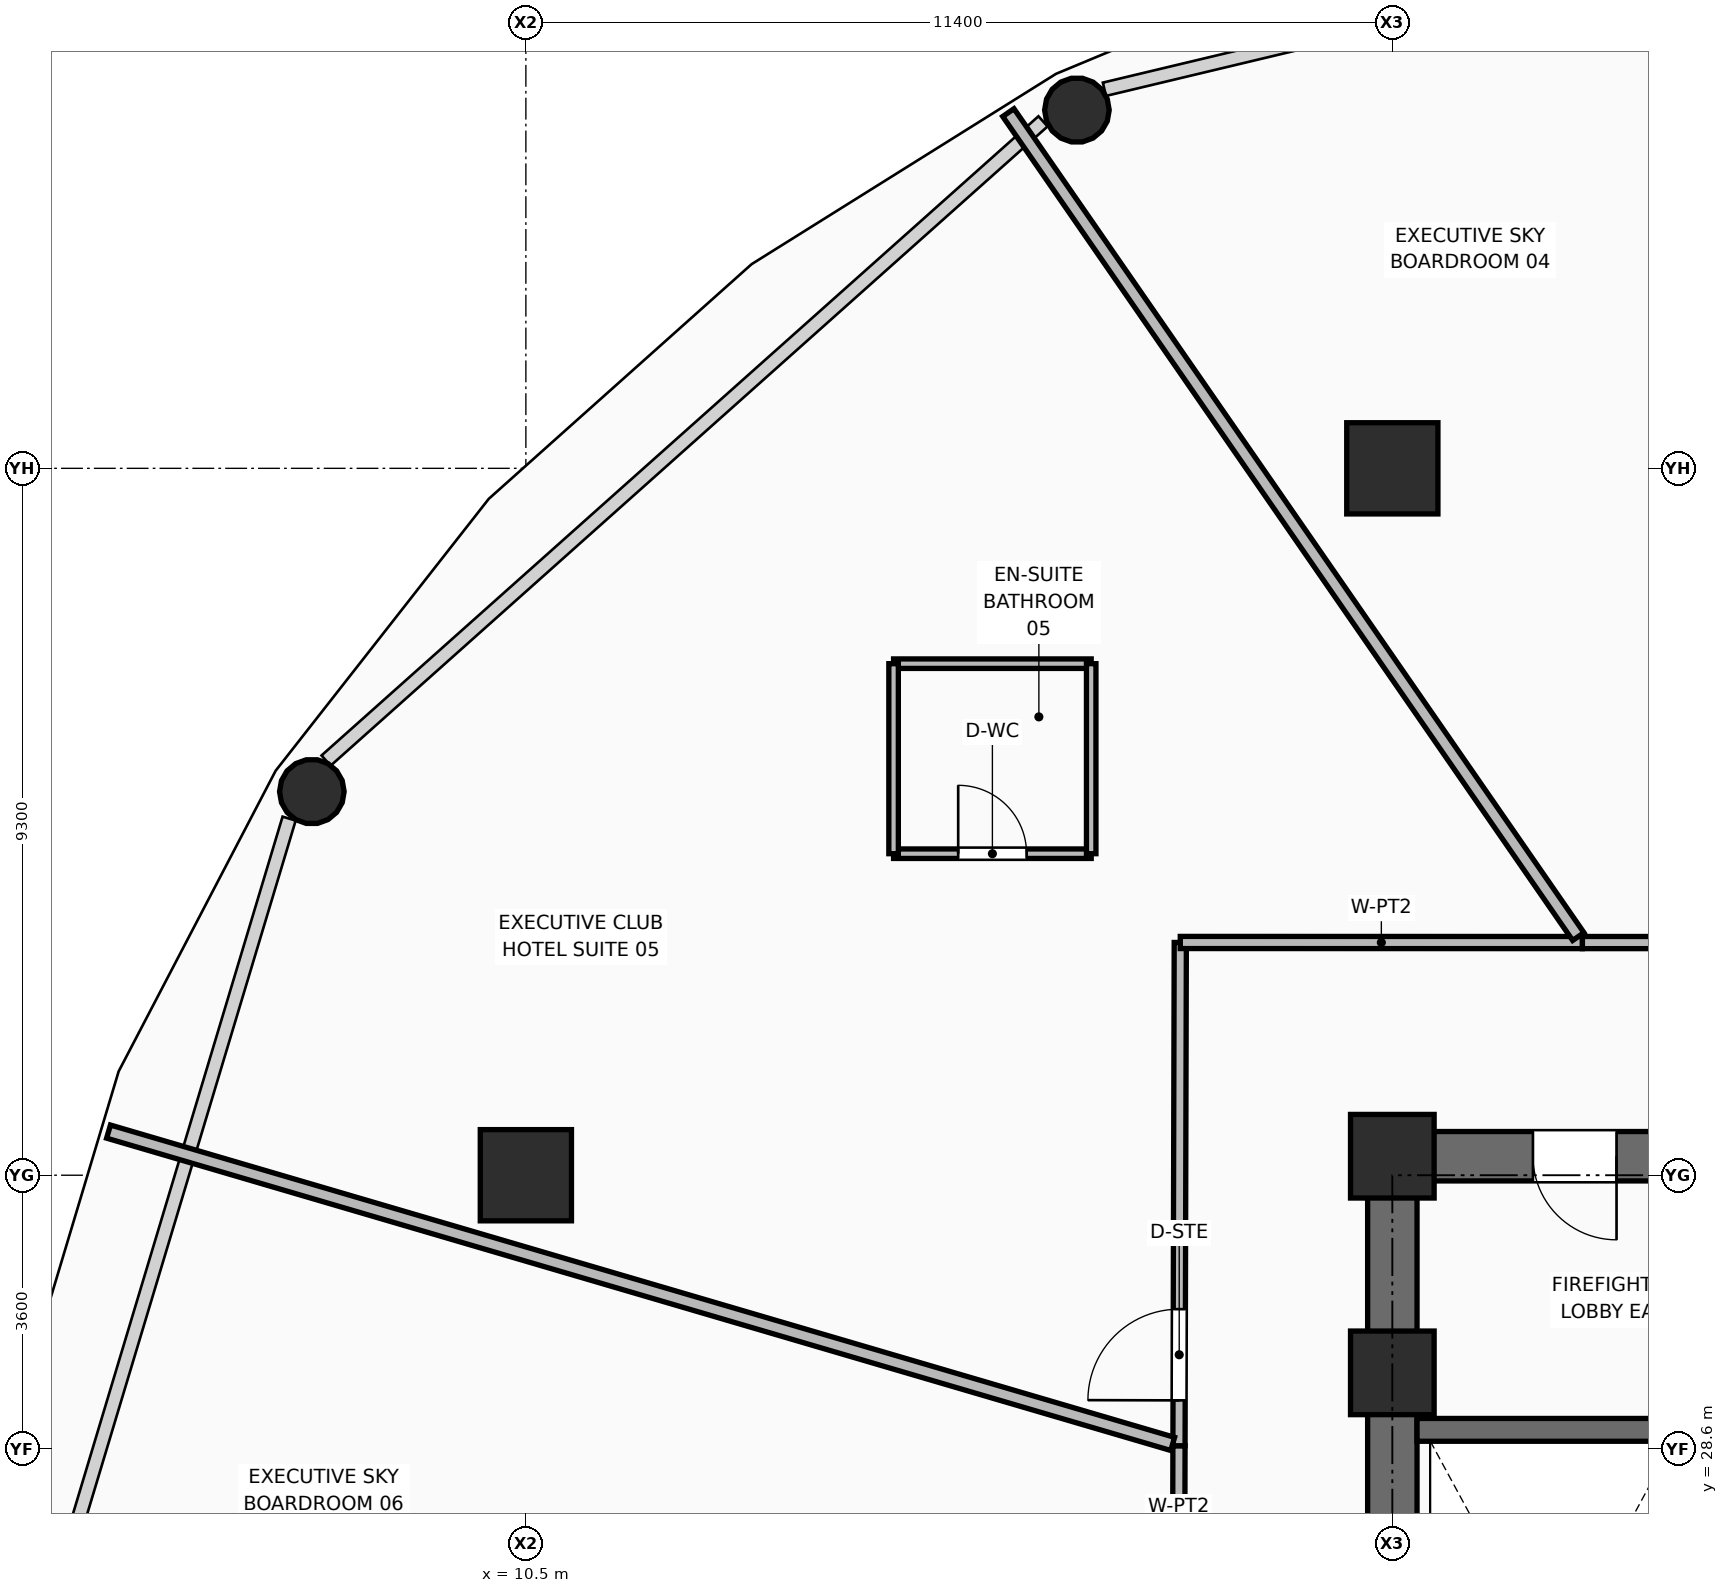
"""IFC4 building model, lengths in metres.
Left out: names, types, materials, properties, quantities, classifications, styles, units other than length and angle.
Written with IfcOpenShell. Run it as: python <this file> out.ifc"""

import sys

from ifc_helpers import new_model, si_unit, direction, frame, frame_2d, origin, origin_2d, place, context, subcontext, project, spatial, rectangle, hollow_rectangle, hollow_circle, extrude, element, fill, save


model = new_model("IFC4")
c1 = context("Model", 3, precision=1e-05, world=origin(), true_north=direction((0.0, 1.0)))
c2 = subcontext(c1, "Body", "Model", "MODEL_VIEW")
j1 = project(units=[si_unit("LENGTHUNIT", "METRE"), si_unit("PLANEANGLEUNIT", "RADIAN")], contexts=[c1])
p1 = place(None, origin())
s1 = spatial("IfcSite", under=j1, at=p1, CompositionType="ELEMENT")
p2 = place(p1, origin())
s2 = spatial("IfcBuilding", under=s1, at=p2, CompositionType="ELEMENT")
p3 = place(p2, frame((0.0, 0.0, 87.0)))
s3 = spatial("IfcBuildingStorey", under=s2, at=p3, CompositionType="ELEMENT", Elevation=87.0)
for number, where, z_axis, x_axis in (
    (1, (21.9, 29.6, 0.0), (0.0, 0.0, 1.0), (1.0, 0.0, 0.0)),
    (2, (21.9, 32.45, 0.0), (0.0, 0.0, 1.0), (1.0, 0.0, 0.0)),
):
    element("IfcColumn", number, at=place(p3, frame(where, z_axis=z_axis, x_axis=x_axis)), inside=s3, PredefinedType="COLUMN", context=c2, shape_type="SweptSolid", body=[
        extrude(rectangle(XDim=1.1, YDim=1.1, at=origin_2d()), origin(), (0.0, 0.0, 1.0), 3.75),
    ])
for number, where, z_axis, x_axis in (
    (3, (10.5, 32.2, 0.0), (0.0, 0.0, 1.0), (1.0, 0.0, 0.0)),
    (4, (21.9, 41.5, 0.0), (0.0, 0.0, 1.0), (1.0, 0.0, 0.0)),
):
    element("IfcColumn", number, at=place(p3, frame(where, z_axis=z_axis, x_axis=x_axis)), inside=s3, PredefinedType="COLUMN", context=c2, shape_type="SweptSolid", body=[
        extrude(hollow_rectangle(XDim=1.2, YDim=1.2, WallThickness=0.045, at=origin_2d()), origin(), (0.0, 0.0, 1.0), 3.75),
    ])
p4 = place(p3, frame((17.75, 46.213, 0.0), z_axis=(0.063867569811, -0.098710723407, 0.993064512814), x_axis=(0.839585964149, 0.543226848383, 0.0)))
e5 = element("IfcColumn", 5, at=p4, inside=s3, PredefinedType="COLUMN", context=c2, shape_type="SweptSolid", body=[
    extrude(hollow_circle(Radius=0.425, WallThickness=0.04, at=origin_2d()), origin(), (0.0, 0.0, 1.0), 3.524),
])
p5 = place(p3, frame((7.684, 37.247, 0.0), z_axis=(0.110532853476, -0.057031353328, 0.992234807412), x_axis=(0.458529519134, 0.888679177253, 0.0)))
e6 = element("IfcColumn", 6, at=p5, inside=s3, PredefinedType="COLUMN", context=c2, shape_type="SweptSolid", body=[
    extrude(hollow_circle(Radius=0.425, WallThickness=0.04, at=origin_2d()), origin(), (0.0, 0.0, 1.0), 3.527),
])
p6 = place(p3, frame((21.575, 32.45, 0.0), z_axis=(0.0, 0.0, 1.0), x_axis=(1.0, 0.0, 0.0)))
e7 = element("IfcWall", 7, at=p6, inside=s3, PredefinedType="SHEAR", context=c2, shape_type="SweptSolid", body=[
    extrude(rectangle(XDim=19.85, YDim=0.65, at=frame_2d((9.925, 0.0))), origin(), (0.0, 0.0, 1.0), 3.5),
])
p7 = place(p6, frame((2.175, 0.0, 0.0)))
e8 = element("IfcOpeningElement", 8, at=p7, cuts=e7, PredefinedType="OPENING", context=c2, shape_type="SweptSolid", body=[
    extrude(rectangle(XDim=1.1, YDim=2.1, at=frame_2d((0.55, 1.05))), frame((0.0, 0.335, 0.0), z_axis=(0.0, -1.0, 0.0), x_axis=(1.0, 0.0, 0.0)), (0.0, 0.0, 1.0), 0.67),
])
p8 = place(p6, frame((15.565, 0.0, 0.0)))
e9 = element("IfcOpeningElement", 9, at=p8, cuts=e7, PredefinedType="OPENING", context=c2, shape_type="SweptSolid", body=[
    extrude(rectangle(XDim=1.0, YDim=2.1, at=frame_2d((0.5, 1.05))), frame((0.0, 0.335, 0.0), z_axis=(0.0, -1.0, 0.0), x_axis=(1.0, 0.0, 0.0)), (0.0, 0.0, 1.0), 0.67),
])
p9 = place(p6, frame((17.575, 0.0, 0.0)))
e10 = element("IfcOpeningElement", 10, at=p9, cuts=e7, PredefinedType="OPENING", context=c2, shape_type="SweptSolid", body=[
    extrude(rectangle(XDim=0.9, YDim=2.1, at=frame_2d((0.45, 1.05))), frame((0.0, 0.335, 0.0), z_axis=(0.0, -1.0, 0.0), x_axis=(1.0, 0.0, 0.0)), (0.0, 0.0, 1.0), 0.67),
])
p10 = place(p3, frame((21.9, 18.125, 0.0), z_axis=(0.0, 0.0, 1.0), x_axis=(0.0, 1.0, 0.0)))
e11 = element("IfcWall", 11, at=p10, inside=s3, PredefinedType="SHEAR", context=c2, shape_type="SweptSolid", body=[
    extrude(rectangle(XDim=14.0, YDim=0.65, at=frame_2d((7.0, 0.0))), origin(), (0.0, 0.0, 1.0), 3.5),
])
p11 = place(p3, frame((22.225, 28.85, 0.0), z_axis=(0.0, 0.0, 1.0), x_axis=(1.0, 0.0, 0.0)))
e12 = element("IfcWall", 12, at=p11, inside=s3, PredefinedType="SHEAR", context=c2, shape_type="SweptSolid", body=[
    extrude(rectangle(XDim=3.515, YDim=0.3, at=frame_2d((1.757, 0.0))), origin(), (0.0, 0.0, 1.0), 3.5),
])
p12 = place(p3, frame((19.087, 26.138, 0.0), z_axis=(0.0, 0.0, 1.0), x_axis=(0.00243830349, 0.999997027334, 0.0)))
e13 = element("IfcWall", 13, at=p12, inside=s3, PredefinedType="PARTITIONING", context=c2, shape_type="SweptSolid", body=[
    extrude(rectangle(XDim=2.503, YDim=0.16, at=frame_2d((1.251, 0.0))), origin(), (0.0, 0.0, 1.0), 3.48),
])
p13 = place(p3, frame((19.093, 28.641, 0.0), z_axis=(0.0, 0.0, 1.0), x_axis=(0.002581207523, 0.999996668678, 0.0)))
e14 = element("IfcWall", 14, at=p13, inside=s3, PredefinedType="PARTITIONING", context=c2, shape_type="SweptSolid", body=[
    extrude(rectangle(XDim=6.621, YDim=0.16, at=frame_2d((3.311, 0.0))), origin(), (0.0, 0.0, 1.0), 2.858),
])
p14 = place(p13, frame((0.597, 0.0, 0.0)))
e15 = element("IfcOpeningElement", 15, at=p14, cuts=e14, PredefinedType="OPENING", context=c2, shape_type="SweptSolid", body=[
    extrude(rectangle(XDim=1.2, YDim=2.1, at=frame_2d((0.6, 1.05))), frame((0.0, 0.09, 0.0), z_axis=(0.0, -1.0, 0.0), x_axis=(1.0, 0.0, 0.0)), (0.0, 0.0, 1.0), 0.18),
])
p15 = place(p3, frame((19.11, 35.262, 0.0), z_axis=(0.0, 0.0, 1.0), x_axis=(0.999999982965, -0.000184578466, 0.0)))
e16 = element("IfcWall", 16, at=p15, inside=s3, PredefinedType="PARTITIONING", context=c2, shape_type="SweptSolid", body=[
    extrude(rectangle(XDim=5.291, YDim=0.16, at=frame_2d((2.646, 0.0))), origin(), (0.0, 0.0, 1.0), 2.858),
])
p16 = place(p3, frame((24.401, 35.261, 0.0), z_axis=(0.0, 0.0, 1.0), x_axis=(0.999999978267, -0.000208485349, 0.0)))
e17 = element("IfcWall", 17, at=p16, inside=s3, PredefinedType="PARTITIONING", context=c2, shape_type="SweptSolid", body=[
    extrude(rectangle(XDim=4.684, YDim=0.16, at=frame_2d((2.342, 0.0))), origin(), (0.0, 0.0, 1.0), 3.48),
])
p17 = place(p16, frame((1.742, 0.0, 0.0)))
e18 = element("IfcOpeningElement", 18, at=p17, cuts=e17, PredefinedType="OPENING", context=c2, shape_type="SweptSolid", body=[
    extrude(rectangle(XDim=1.2, YDim=2.1, at=frame_2d((0.6, 1.05))), frame((0.0, 0.09, 0.0), z_axis=(0.0, -1.0, 0.0), x_axis=(1.0, 0.0, 0.0)), (0.0, 0.0, 1.0), 0.18),
])
p18 = place(p3, frame((24.347, 35.34, 0.0), z_axis=(0.0, 0.0, 1.0), x_axis=(-0.568928704045, 0.822386849186, 0.0)))
e19 = element("IfcWall", 19, at=p18, inside=s3, PredefinedType="PARTITIONING", context=c2, shape_type="SweptSolid", body=[
    extrude(rectangle(XDim=13.181, YDim=0.18, at=frame_2d((6.59, 0.0))), origin(), (0.0, 0.0, 1.0), 2.705),
])
p19 = place(p3, frame((19.01, 28.665, 0.0), z_axis=(0.0, 0.0, 1.0), x_axis=(-0.959533182325, 0.281595582383, 0.0)))
e20 = element("IfcWall", 20, at=p19, inside=s3, PredefinedType="PARTITIONING", context=c2, shape_type="SweptSolid", body=[
    extrude(rectangle(XDim=14.592, YDim=0.18, at=frame_2d((7.296, 0.0))), origin(), (0.0, 0.0, 1.0), 2.705),
])
p20 = place(p3, frame((15.338, 36.43, 0.0), z_axis=(0.0, 0.0, 1.0), x_axis=(1.0, 0.0, 0.0)))
e21 = element("IfcWall", 21, at=p20, inside=s3, PredefinedType="PARTITIONING", context=c2, shape_type="SweptSolid", body=[
    extrude(rectangle(XDim=2.6, YDim=0.125, at=frame_2d((1.3, 0.0))), origin(), (0.0, 0.0, 1.0), 3.48),
])
p21 = place(p20, frame((0.85, 0.0, 0.0)))
e22 = element("IfcOpeningElement", 22, at=p21, cuts=e21, PredefinedType="OPENING", context=c2, shape_type="SweptSolid", body=[
    extrude(rectangle(XDim=0.9, YDim=2.1, at=frame_2d((0.45, 1.05))), frame((0.0, 0.073, 0.0), z_axis=(0.0, -1.0, 0.0), x_axis=(1.0, 0.0, 0.0)), (0.0, 0.0, 1.0), 0.145),
])
p22 = place(p3, frame((15.338, 38.93, 0.0), z_axis=(0.0, 0.0, 1.0), x_axis=(1.0, 0.0, 0.0)))
e23 = element("IfcWall", 23, at=p22, inside=s3, PredefinedType="PARTITIONING", context=c2, shape_type="SweptSolid", body=[
    extrude(rectangle(XDim=2.6, YDim=0.125, at=frame_2d((1.3, 0.0))), origin(), (0.0, 0.0, 1.0), 3.48),
])
for number, where, z_axis, x_axis in (
    (24, (15.338, 36.43, 0.0), (0.0, 0.0, 1.0), (0.0, 1.0, 0.0)),
    (25, (17.938, 36.43, 0.0), (0.0, 0.0, 1.0), (0.0, 1.0, 0.0)),
):
    element("IfcWall", number, at=place(p3, frame(where, z_axis=z_axis, x_axis=x_axis)), inside=s3, PredefinedType="PARTITIONING", context=c2, shape_type="SweptSolid", body=[
        extrude(rectangle(XDim=2.5, YDim=0.125, at=frame_2d((1.25, 0.0))), origin(), (0.0, 0.0, 1.0), 3.48),
    ])
p23 = place(p7, frame((1.1, 0.0, 0.0), z_axis=(0.0, 0.0, 1.0), x_axis=(-1.0, 0.0, 0.0)))
e26 = element("IfcDoor", 26, at=p23, inside=s3, OperationType="SINGLE_SWING_LEFT", PredefinedType="DOOR", context=c2, shape_type="SweptSolid", body=[
    extrude(rectangle(XDim=1.1, YDim=2.1, at=frame_2d((0.55, 1.05))), frame((0.0, 0.025, 0.0), z_axis=(0.0, -1.0, 0.0), x_axis=(1.0, 0.0, 0.0)), (0.0, 0.0, 1.0), 0.05),
])
fill(e8, e26)
p24 = place(p21, origin())
e27 = element("IfcDoor", 27, at=p24, inside=s3, OperationType="SINGLE_SWING_LEFT", PredefinedType="DOOR", context=c2, shape_type="SweptSolid", body=[
    extrude(rectangle(XDim=0.9, YDim=2.1, at=frame_2d((0.45, 1.05))), frame((0.0, 0.025, 0.0), z_axis=(0.0, -1.0, 0.0), x_axis=(1.0, 0.0, 0.0)), (0.0, 0.0, 1.0), 0.05),
])
fill(e22, e27)
p25 = place(p14, origin())
e28 = element("IfcDoor", 28, at=p25, inside=s3, OperationType="SINGLE_SWING_LEFT", PredefinedType="DOOR", context=c2, shape_type="SweptSolid", body=[
    extrude(rectangle(XDim=1.2, YDim=2.1, at=frame_2d((0.6, 1.05))), frame((0.0, 0.025, 0.0), z_axis=(0.0, -1.0, 0.0), x_axis=(1.0, 0.0, 0.0)), (0.0, 0.0, 1.0), 0.05),
])
fill(e15, e28)
save(model, sys.argv[1])
